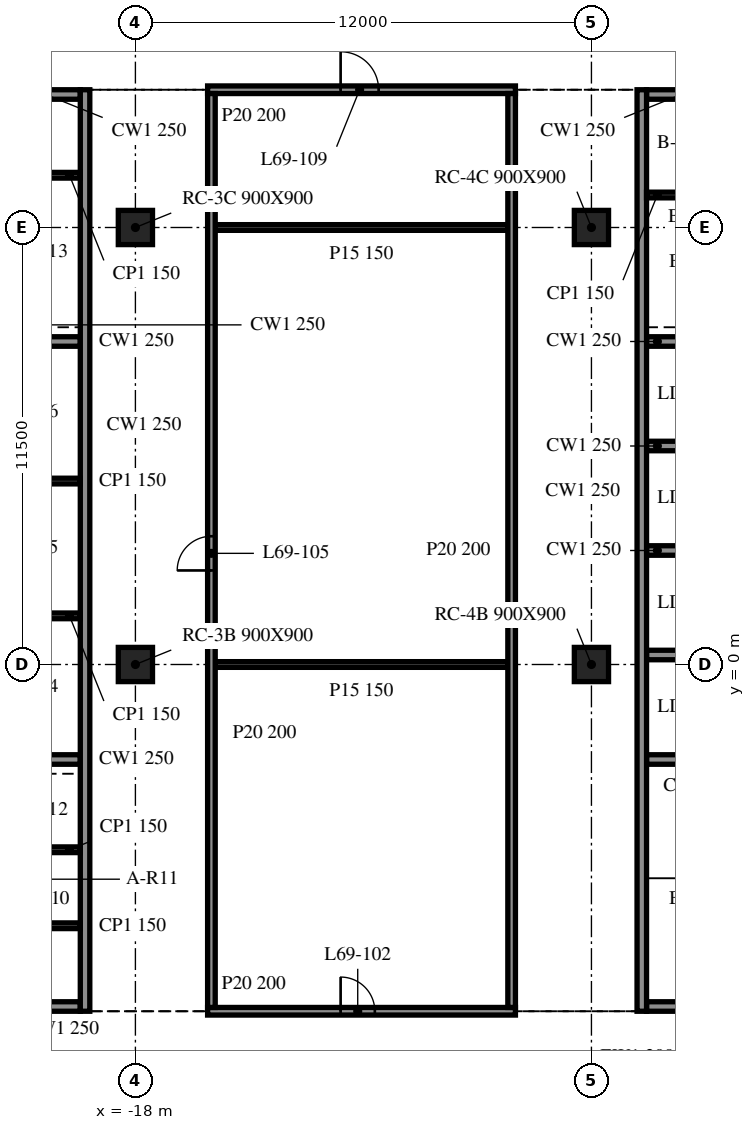
"""IFC4 building model, lengths in metres.
Left out: names, types, materials, properties, quantities, classifications, styles, units other than length and angle.
Written with IfcOpenShell. Run it as: python <this file> out.ifc"""

import sys

from ifc_helpers import new_model, si_unit, direction, frame, frame_2d, origin, origin_2d, place, context, subcontext, project, spatial, rectangle, extrude, element, fill, save


model = new_model("IFC4")
c1 = context("Model", 3, precision=1e-05, world=origin(), true_north=direction((0.0, 1.0)))
c2 = subcontext(c1, "Body", "Model", "MODEL_VIEW")
j1 = project(units=[si_unit("LENGTHUNIT", "METRE"), si_unit("PLANEANGLEUNIT", "RADIAN")], contexts=[c1])
p1 = place(None, origin())
s1 = spatial("IfcSite", under=j1, at=p1, CompositionType="ELEMENT")
p2 = place(p1, origin())
s2 = spatial("IfcBuilding", under=s1, at=p2, CompositionType="ELEMENT")
p3 = place(p2, frame((0.0, 0.0, 282.3)))
s3 = spatial("IfcBuildingStorey", under=s2, at=p3, CompositionType="ELEMENT", Elevation=282.3)
for number, where, z_axis, x_axis in (
    (1, (-18.0, 0.0, -0.34), (0.0, 0.0, 1.0), (1.0, 0.0, 0.0)),
    (2, (-18.0, 11.5, -0.34), (0.0, 0.0, 1.0), (1.0, 0.0, 0.0)),
    (3, (-6.0, 0.0, -0.34), (0.0, 0.0, 1.0), (1.0, 0.0, 0.0)),
    (4, (-6.0, 11.5, -0.34), (0.0, 0.0, 1.0), (1.0, 0.0, 0.0)),
):
    element("IfcColumn", number, at=place(p3, frame(where, z_axis=z_axis, x_axis=x_axis)), inside=s3, PredefinedType="COLUMN", context=c2, shape_type="SweptSolid", body=[
        extrude(rectangle(XDim=0.9, YDim=0.9, at=origin_2d()), origin(), (0.0, 0.0, 1.0), 7.34),
    ])
p4 = place(p3, frame((-19.325, -9.125, 0.0), z_axis=(0.0, 0.0, 1.0), x_axis=(0.0, 1.0, 0.0)))
e5 = element("IfcWall", 5, at=p4, inside=s3, PredefinedType="SOLIDWALL", context=c2, shape_type="SweptSolid", body=[
    extrude(rectangle(XDim=24.25, YDim=0.25, at=frame_2d((12.125, 0.0))), origin(), (0.0, 0.0, 1.0), 3.46),
])
p5 = place(p3, frame((-19.45, -9.0, 0.0), z_axis=(0.0, 0.0, 1.0), x_axis=(-1.0, 0.0, 0.0)))
e6 = element("IfcWall", 6, at=p5, inside=s3, PredefinedType="SOLIDWALL", context=c2, shape_type="SweptSolid", body=[
    extrude(rectangle(XDim=9.1, YDim=0.25, at=frame_2d((4.55, 0.0))), origin(), (0.0, 0.0, 1.0), 3.46),
])
p6 = place(p5, frame((3.65, 0.0, 0.0)))
e7 = element("IfcOpeningElement", 7, at=p6, cuts=e6, PredefinedType="OPENING", context=c2, shape_type="SweptSolid", body=[
    extrude(rectangle(XDim=1.8, YDim=2.1, at=frame_2d((0.9, 1.05))), frame((0.0, 0.135, 0.0), z_axis=(0.0, -1.0, 0.0), x_axis=(1.0, 0.0, 0.0)), (0.0, 0.0, 1.0), 0.27),
])
p7 = place(p3, frame((-28.55, 15.0, 0.0), z_axis=(0.0, 0.0, 1.0), x_axis=(1.0, 0.0, 0.0)))
e8 = element("IfcWall", 8, at=p7, inside=s3, PredefinedType="SOLIDWALL", context=c2, shape_type="SweptSolid", body=[
    extrude(rectangle(XDim=9.1, YDim=0.25, at=frame_2d((4.55, 0.0))), origin(), (0.0, 0.0, 1.0), 3.46),
])
p8 = place(p7, frame((3.65, 0.0, 0.0)))
e9 = element("IfcOpeningElement", 9, at=p8, cuts=e8, PredefinedType="OPENING", context=c2, shape_type="SweptSolid", body=[
    extrude(rectangle(XDim=1.8, YDim=2.1, at=frame_2d((0.9, 1.05))), frame((0.0, 0.135, 0.0), z_axis=(0.0, -1.0, 0.0), x_axis=(1.0, 0.0, 0.0)), (0.0, 0.0, 1.0), 0.27),
])
for number, where, z_axis, x_axis in (
    (10, (-22.3, -2.5, 0.0), (0.0, 0.0, 1.0), (1.0, 0.0, 0.0)),
    (11, (-22.3, 8.5, 0.0), (0.0, 0.0, 1.0), (1.0, 0.0, 0.0)),
):
    element("IfcWall", number, at=place(p3, frame(where, z_axis=z_axis, x_axis=x_axis)), inside=s3, PredefinedType="SOLIDWALL", context=c2, shape_type="SweptSolid", body=[
        extrude(rectangle(XDim=2.85, YDim=0.25, at=frame_2d((1.425, 0.0))), origin(), (0.0, 0.0, 1.0), 3.46),
    ])
for number, where, z_axis, x_axis in (
    (12, (-22.3, 1.28, 0.0), (0.0, 0.0, 1.0), (1.0, 0.0, 0.0)),
    (13, (-22.3, 4.827, 0.0), (0.0, 0.0, 1.0), (1.0, 0.0, 0.0)),
    (14, (-22.3, -6.875, 0.0), (0.0, 0.0, 1.0), (1.0, 0.0, 0.0)),
    (15, (-22.3, -4.875, 0.0), (0.0, 0.0, 1.0), (1.0, 0.0, 0.0)),
    (16, (-22.3, 12.875, 0.0), (0.0, 0.0, 1.0), (1.0, 0.0, 0.0)),
):
    element("IfcWall", number, at=place(p3, frame(where, z_axis=z_axis, x_axis=x_axis)), inside=s3, PredefinedType="PARTITIONING", context=c2, shape_type="SweptSolid", body=[
        extrude(rectangle(XDim=2.85, YDim=0.15, at=frame_2d((1.425, 0.0))), origin(), (0.0, 0.0, 1.0), 3.46),
    ])
p9 = place(p3, frame((-4.675, 15.125, 0.0), z_axis=(0.0, 0.0, 1.0), x_axis=(0.0, -1.0, 0.0)))
e17 = element("IfcWall", 17, at=p9, inside=s3, PredefinedType="SOLIDWALL", context=c2, shape_type="SweptSolid", body=[
    extrude(rectangle(XDim=24.25, YDim=0.25, at=frame_2d((12.125, 0.0))), origin(), (0.0, 0.0, 1.0), 3.46),
])
p10 = place(p3, frame((4.55, -9.0, 0.0), z_axis=(0.0, 0.0, 1.0), x_axis=(-1.0, 0.0, 0.0)))
e18 = element("IfcWall", 18, at=p10, inside=s3, PredefinedType="SOLIDWALL", context=c2, shape_type="SweptSolid", body=[
    extrude(rectangle(XDim=9.1, YDim=0.25, at=frame_2d((4.55, 0.0))), origin(), (0.0, 0.0, 1.0), 3.46),
])
p11 = place(p10, frame((3.65, 0.0, 0.0)))
e19 = element("IfcOpeningElement", 19, at=p11, cuts=e18, PredefinedType="OPENING", context=c2, shape_type="SweptSolid", body=[
    extrude(rectangle(XDim=1.8, YDim=2.1, at=frame_2d((0.9, 1.05))), frame((0.0, 0.135, 0.0), z_axis=(0.0, -1.0, 0.0), x_axis=(1.0, 0.0, 0.0)), (0.0, 0.0, 1.0), 0.27),
])
p12 = place(p3, frame((-4.55, 15.0, 0.0), z_axis=(0.0, 0.0, 1.0), x_axis=(1.0, 0.0, 0.0)))
e20 = element("IfcWall", 20, at=p12, inside=s3, PredefinedType="SOLIDWALL", context=c2, shape_type="SweptSolid", body=[
    extrude(rectangle(XDim=9.1, YDim=0.25, at=frame_2d((4.55, 0.0))), origin(), (0.0, 0.0, 1.0), 3.46),
])
p13 = place(p12, frame((3.65, 0.0, 0.0)))
e21 = element("IfcOpeningElement", 21, at=p13, cuts=e20, PredefinedType="OPENING", context=c2, shape_type="SweptSolid", body=[
    extrude(rectangle(XDim=1.8, YDim=2.1, at=frame_2d((0.9, 1.05))), frame((0.0, 0.135, 0.0), z_axis=(0.0, -1.0, 0.0), x_axis=(1.0, 0.0, 0.0)), (0.0, 0.0, 1.0), 0.27),
])
for number, where, z_axis, x_axis in (
    (22, (-4.55, -2.5, 0.0), (0.0, 0.0, 1.0), (1.0, 0.0, 0.0)),
    (23, (-4.55, 0.25, 0.0), (0.0, 0.0, 1.0), (1.0, 0.0, 0.0)),
    (24, (-4.55, 3.0, 0.0), (0.0, 0.0, 1.0), (1.0, 0.0, 0.0)),
    (25, (-4.55, 5.75, 0.0), (0.0, 0.0, 1.0), (1.0, 0.0, 0.0)),
    (26, (-4.55, 8.5, 0.0), (0.0, 0.0, 1.0), (1.0, 0.0, 0.0)),
):
    element("IfcWall", number, at=place(p3, frame(where, z_axis=z_axis, x_axis=x_axis)), inside=s3, PredefinedType="SOLIDWALL", context=c2, shape_type="SweptSolid", body=[
        extrude(rectangle(XDim=2.85, YDim=0.25, at=frame_2d((1.425, 0.0))), origin(), (0.0, 0.0, 1.0), 3.46),
    ])
p14 = place(p3, frame((-4.55, 12.355, 0.0), z_axis=(0.0, 0.0, 1.0), x_axis=(1.0, 0.0, 0.0)))
e27 = element("IfcWall", 27, at=p14, inside=s3, PredefinedType="PARTITIONING", context=c2, shape_type="SweptSolid", body=[
    extrude(rectangle(XDim=2.85, YDim=0.15, at=frame_2d((1.425, 0.0))), origin(), (0.0, 0.0, 1.0), 3.46),
])
p15 = place(p3, frame((-16.1, -9.125, 0.0), z_axis=(0.0, 0.0, 1.0), x_axis=(1.0, 0.0, 0.0)))
e28 = element("IfcWall", 28, at=p15, inside=s3, PredefinedType="PARTITIONING", context=c2, shape_type="SweptSolid", body=[
    extrude(rectangle(XDim=8.1, YDim=0.2, at=frame_2d((4.05, 0.0))), origin(), (0.0, 0.0, 1.0), 3.4),
])
p16 = place(p15, frame((3.5, 0.0, 0.0)))
e29 = element("IfcOpeningElement", 29, at=p16, cuts=e28, PredefinedType="OPENING", context=c2, shape_type="SweptSolid", body=[
    extrude(rectangle(XDim=0.9, YDim=2.1, at=frame_2d((0.45, 1.05))), frame((0.0, 0.11, 0.0), z_axis=(0.0, -1.0, 0.0), x_axis=(1.0, 0.0, 0.0)), (0.0, 0.0, 1.0), 0.22),
])
for number, where, z_axis, x_axis in (
    (30, (-15.9, 0.0, 0.0), (0.0, 0.0, 1.0), (1.0, 0.0, 0.0)),
    (31, (-15.9, 11.5, 0.0), (0.0, 0.0, 1.0), (1.0, 0.0, 0.0)),
):
    element("IfcWall", number, at=place(p3, frame(where, z_axis=z_axis, x_axis=x_axis)), inside=s3, PredefinedType="PARTITIONING", context=c2, shape_type="SweptSolid", body=[
        extrude(rectangle(XDim=7.7, YDim=0.15, at=frame_2d((3.85, 0.0))), origin(), (0.0, 0.0, 1.0), 3.4),
    ])
p17 = place(p3, frame((-16.1, 15.125, 0.0), z_axis=(0.0, 0.0, 1.0), x_axis=(1.0, 0.0, 0.0)))
e32 = element("IfcWall", 32, at=p17, inside=s3, PredefinedType="PARTITIONING", context=c2, shape_type="SweptSolid", body=[
    extrude(rectangle(XDim=8.1, YDim=0.2, at=frame_2d((4.05, 0.0))), origin(), (0.0, 0.0, 1.0), 3.4),
])
p18 = place(p17, frame((3.5, 0.0, 0.0)))
e33 = element("IfcOpeningElement", 33, at=p18, cuts=e32, PredefinedType="OPENING", context=c2, shape_type="SweptSolid", body=[
    extrude(rectangle(XDim=1.0, YDim=2.1, at=frame_2d((0.5, 1.05))), frame((0.0, 0.11, 0.0), z_axis=(0.0, -1.0, 0.0), x_axis=(1.0, 0.0, 0.0)), (0.0, 0.0, 1.0), 0.22),
])
p19 = place(p3, frame((-16.0, -9.025, 0.0), z_axis=(0.0, 0.0, 1.0), x_axis=(0.0, 1.0, 0.0)))
e34 = element("IfcWall", 34, at=p19, inside=s3, PredefinedType="PARTITIONING", context=c2, shape_type="SweptSolid", body=[
    extrude(rectangle(XDim=24.05, YDim=0.2, at=frame_2d((12.025, 0.0))), origin(), (0.0, 0.0, 1.0), 3.4),
])
p20 = place(p19, frame((11.5, 0.0, 0.0)))
e35 = element("IfcOpeningElement", 35, at=p20, cuts=e34, PredefinedType="OPENING", context=c2, shape_type="SweptSolid", body=[
    extrude(rectangle(XDim=0.9, YDim=2.1, at=frame_2d((0.45, 1.05))), frame((0.0, 0.11, 0.0), z_axis=(0.0, -1.0, 0.0), x_axis=(1.0, 0.0, 0.0)), (0.0, 0.0, 1.0), 0.22),
])
p21 = place(p3, frame((-8.1, -9.025, 0.0), z_axis=(0.0, 0.0, 1.0), x_axis=(0.0, 1.0, 0.0)))
e36 = element("IfcWall", 36, at=p21, inside=s3, PredefinedType="PARTITIONING", context=c2, shape_type="SweptSolid", body=[
    extrude(rectangle(XDim=24.05, YDim=0.2, at=frame_2d((12.025, 0.0))), origin(), (0.0, 0.0, 1.0), 3.4),
])
p22 = place(p16, origin())
e37 = element("IfcDoor", 37, at=p22, inside=s3, OperationType="SINGLE_SWING_LEFT", PredefinedType="DOOR", context=c2, shape_type="SweptSolid", body=[
    extrude(rectangle(XDim=0.9, YDim=2.1, at=frame_2d((0.45, 1.05))), frame((0.0, 0.025, 0.0), z_axis=(0.0, -1.0, 0.0), x_axis=(1.0, 0.0, 0.0)), (0.0, 0.0, 1.0), 0.05),
])
fill(e29, e37)
p23 = place(p20, origin())
e38 = element("IfcDoor", 38, at=p23, inside=s3, OperationType="SINGLE_SWING_RIGHT", PredefinedType="DOOR", context=c2, shape_type="SweptSolid", body=[
    extrude(rectangle(XDim=0.9, YDim=2.1, at=frame_2d((0.45, 1.05))), frame((0.0, 0.025, 0.0), z_axis=(0.0, -1.0, 0.0), x_axis=(1.0, 0.0, 0.0)), (0.0, 0.0, 1.0), 0.05),
])
fill(e35, e38)
p24 = place(p18, origin())
e39 = element("IfcDoor", 39, at=p24, inside=s3, OperationType="SINGLE_SWING_RIGHT", PredefinedType="DOOR", context=c2, shape_type="SweptSolid", body=[
    extrude(rectangle(XDim=1.0, YDim=2.1, at=frame_2d((0.5, 1.05))), frame((0.0, 0.025, 0.0), z_axis=(0.0, -1.0, 0.0), x_axis=(1.0, 0.0, 0.0)), (0.0, 0.0, 1.0), 0.05),
])
fill(e33, e39)
save(model, sys.argv[1])
